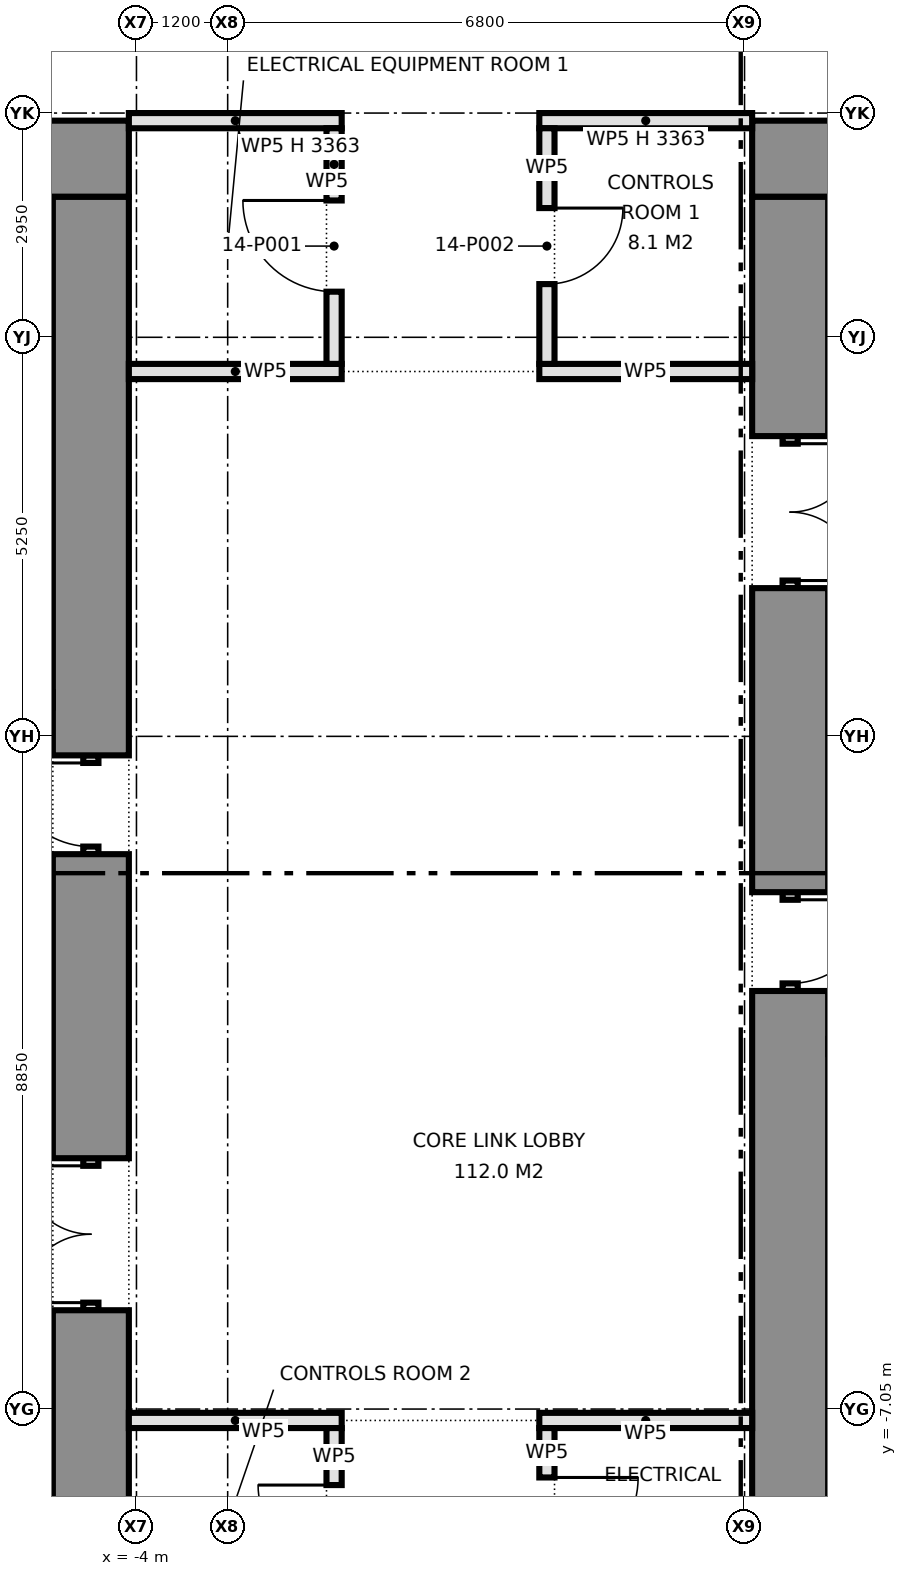
"""IFC4 building model, lengths in metres.
Left out: names, types, materials, properties, quantities, classifications, styles, units other than length and angle.
Written with IfcOpenShell. Run it as: python <this file> out.ifc"""

import sys

from ifc_helpers import new_model, si_unit, direction, frame, frame_2d, origin, place, context, subcontext, project, spatial, rectangle, extrude, element, fill, save


model = new_model("IFC4")
c1 = context("Model", 3, precision=1e-05, world=origin(), true_north=direction((0.0, 1.0)))
c2 = subcontext(c1, "Body", "Model", "MODEL_VIEW")
j1 = project(units=[si_unit("LENGTHUNIT", "METRE"), si_unit("PLANEANGLEUNIT", "RADIAN")], contexts=[c1])
p1 = place(None, origin())
s1 = spatial("IfcSite", under=j1, at=p1, CompositionType="ELEMENT")
p2 = place(p1, origin())
s2 = spatial("IfcBuilding", under=s1, at=p2, CompositionType="ELEMENT")
p3 = place(p2, frame((0.0, 0.0, 64.1)))
s3 = spatial("IfcBuildingStorey", under=s2, at=p3, CompositionType="ELEMENT", Elevation=64.1)
p4 = place(p3, frame((-14.9, 9.4, 0.0), z_axis=(0.0, 0.0, 1.0), x_axis=(1.0, 0.0, 0.0)))
e1 = element("IfcWall", 1, at=p4, inside=s3, PredefinedType="SHEAR", context=c2, shape_type="SweptSolid", body=[
    extrude(rectangle(XDim=10.8, YDim=1.0, at=frame_2d((5.4, 0.0))), origin(), (0.0, 0.0, 1.0), 4.3),
])
p5 = place(p3, frame((-4.6, -8.9, 0.0), z_axis=(0.0, 0.0, 1.0), x_axis=(0.0, 1.0, 0.0)))
e2 = element("IfcWall", 2, at=p5, inside=s3, PredefinedType="SHEAR", context=c2, shape_type="SweptSolid", body=[
    extrude(rectangle(XDim=3.15, YDim=1.0, at=frame_2d((1.575, 0.0))), origin(), (0.0, 0.0, 1.0), 4.3),
])
p6 = place(p3, frame((-4.6, -5.75, 0.0), z_axis=(0.0, 0.0, 1.0), x_axis=(0.0, 1.0, 0.0)))
e3 = element("IfcWall", 3, at=p6, inside=s3, PredefinedType="PARTITIONING", context=c2, shape_type="SweptSolid", body=[
    extrude(rectangle(XDim=2.0, YDim=0.2, at=frame_2d((1.0, 0.0))), origin(), (0.0, 0.0, 1.0), 2.4),
])
p7 = place(p6, frame((0.1, 0.0, 0.0)))
e4 = element("IfcOpeningElement", 4, at=p7, cuts=e3, PredefinedType="OPENING", context=c2, shape_type="SweptSolid", body=[
    extrude(rectangle(XDim=1.8, YDim=2.1, at=frame_2d((0.9, 1.05))), frame((0.0, 0.11, 0.0), z_axis=(0.0, -1.0, 0.0), x_axis=(1.0, 0.0, 0.0)), (0.0, 0.0, 1.0), 0.22),
])
p8 = place(p3, frame((-4.6, -3.75, 0.0), z_axis=(0.0, 0.0, 1.0), x_axis=(0.0, 1.0, 0.0)))
e5 = element("IfcWall", 5, at=p8, inside=s3, PredefinedType="SHEAR", context=c2, shape_type="SweptSolid", body=[
    extrude(rectangle(XDim=4.0, YDim=1.0, at=frame_2d((2.0, 0.0))), origin(), (0.0, 0.0, 1.0), 4.3),
])
p9 = place(p3, frame((-4.6, 0.25, 0.0), z_axis=(0.0, 0.0, 1.0), x_axis=(0.0, 1.0, 0.0)))
e6 = element("IfcWall", 6, at=p9, inside=s3, PredefinedType="PARTITIONING", context=c2, shape_type="SweptSolid", body=[
    extrude(rectangle(XDim=1.3, YDim=0.2, at=frame_2d((0.65, 0.0))), origin(), (0.0, 0.0, 1.0), 2.4),
])
p10 = place(p9, frame((0.1, 0.0, 0.0)))
e7 = element("IfcOpeningElement", 7, at=p10, cuts=e6, PredefinedType="OPENING", context=c2, shape_type="SweptSolid", body=[
    extrude(rectangle(XDim=1.1, YDim=2.1, at=frame_2d((0.55, 1.05))), frame((0.0, 0.11, 0.0), z_axis=(0.0, -1.0, 0.0), x_axis=(1.0, 0.0, 0.0)), (0.0, 0.0, 1.0), 0.22),
])
p11 = place(p3, frame((-4.6, 1.55, 0.0), z_axis=(0.0, 0.0, 1.0), x_axis=(0.0, 1.0, 0.0)))
e8 = element("IfcWall", 8, at=p11, inside=s3, PredefinedType="SHEAR", context=c2, shape_type="SweptSolid", body=[
    extrude(rectangle(XDim=7.35, YDim=1.0, at=frame_2d((3.675, 0.0))), origin(), (0.0, 0.0, 1.0), 4.3),
])
p12 = place(p3, frame((14.9, 9.4, 0.0), z_axis=(0.0, 0.0, 1.0), x_axis=(-1.0, 0.0, 0.0)))
e9 = element("IfcWall", 9, at=p12, inside=s3, PredefinedType="SHEAR", context=c2, shape_type="SweptSolid", body=[
    extrude(rectangle(XDim=10.8, YDim=1.0, at=frame_2d((5.4, 0.0))), origin(), (0.0, 0.0, 1.0), 4.3),
])
p13 = place(p3, frame((4.6, 8.9, 0.0), z_axis=(0.0, 0.0, 1.0), x_axis=(0.0, -1.0, 0.0)))
e10 = element("IfcWall", 10, at=p13, inside=s3, PredefinedType="SHEAR", context=c2, shape_type="SweptSolid", body=[
    extrude(rectangle(XDim=3.15, YDim=1.0, at=frame_2d((1.575, 0.0))), origin(), (0.0, 0.0, 1.0), 4.3),
])
p14 = place(p3, frame((4.6, 5.75, 0.0), z_axis=(0.0, 0.0, 1.0), x_axis=(0.0, -1.0, 0.0)))
e11 = element("IfcWall", 11, at=p14, inside=s3, PredefinedType="PARTITIONING", context=c2, shape_type="SweptSolid", body=[
    extrude(rectangle(XDim=2.0, YDim=0.2, at=frame_2d((1.0, 0.0))), origin(), (0.0, 0.0, 1.0), 2.4),
])
p15 = place(p14, frame((0.1, 0.0, 0.0)))
e12 = element("IfcOpeningElement", 12, at=p15, cuts=e11, PredefinedType="OPENING", context=c2, shape_type="SweptSolid", body=[
    extrude(rectangle(XDim=1.8, YDim=2.1, at=frame_2d((0.9, 1.05))), frame((0.0, 0.11, 0.0), z_axis=(0.0, -1.0, 0.0), x_axis=(1.0, 0.0, 0.0)), (0.0, 0.0, 1.0), 0.22),
])
p16 = place(p3, frame((4.6, 3.75, 0.0), z_axis=(0.0, 0.0, 1.0), x_axis=(0.0, -1.0, 0.0)))
e13 = element("IfcWall", 13, at=p16, inside=s3, PredefinedType="SHEAR", context=c2, shape_type="SweptSolid", body=[
    extrude(rectangle(XDim=4.0, YDim=1.0, at=frame_2d((2.0, 0.0))), origin(), (0.0, 0.0, 1.0), 4.3),
])
p17 = place(p3, frame((4.6, -0.25, 0.0), z_axis=(0.0, 0.0, 1.0), x_axis=(0.0, -1.0, 0.0)))
e14 = element("IfcWall", 14, at=p17, inside=s3, PredefinedType="PARTITIONING", context=c2, shape_type="SweptSolid", body=[
    extrude(rectangle(XDim=1.3, YDim=0.2, at=frame_2d((0.65, 0.0))), origin(), (0.0, 0.0, 1.0), 2.4),
])
p18 = place(p17, frame((0.1, 0.0, 0.0)))
e15 = element("IfcOpeningElement", 15, at=p18, cuts=e14, PredefinedType="OPENING", context=c2, shape_type="SweptSolid", body=[
    extrude(rectangle(XDim=1.1, YDim=2.1, at=frame_2d((0.55, 1.05))), frame((0.0, 0.11, 0.0), z_axis=(0.0, -1.0, 0.0), x_axis=(1.0, 0.0, 0.0)), (0.0, 0.0, 1.0), 0.22),
])
p19 = place(p3, frame((4.6, -1.55, 0.0), z_axis=(0.0, 0.0, 1.0), x_axis=(0.0, -1.0, 0.0)))
e16 = element("IfcWall", 16, at=p19, inside=s3, PredefinedType="SHEAR", context=c2, shape_type="SweptSolid", body=[
    extrude(rectangle(XDim=7.35, YDim=1.0, at=frame_2d((3.675, 0.0))), origin(), (0.0, 0.0, 1.0), 4.3),
])
for number, where, z_axis, x_axis in (
    (17, (-4.1, -7.2, 0.0), (0.0, 0.0, 1.0), (1.0, 0.0, 0.0)),
    (18, (1.3, -7.2, 0.0), (0.0, 0.0, 1.0), (1.0, 0.0, 0.0)),
    (19, (-4.1, 6.6, 0.0), (0.0, 0.0, 1.0), (1.0, 0.0, 0.0)),
    (20, (1.3, 6.6, 0.0), (0.0, 0.0, 1.0), (1.0, 0.0, 0.0)),
):
    element("IfcWall", number, at=place(p3, frame(where, z_axis=z_axis, x_axis=x_axis)), inside=s3, PredefinedType="PARTITIONING", context=c2, shape_type="SweptSolid", body=[
        extrude(rectangle(XDim=2.8, YDim=0.2, at=frame_2d((1.4, 0.0))), origin(), (0.0, 0.0, 1.0), 4.3),
    ])
for number, where, z_axis, x_axis in (
    (21, (-4.1, 9.9, 0.0), (0.0, 0.0, 1.0), (1.0, 0.0, 0.0)),
    (22, (1.3, 9.9, 0.0), (0.0, 0.0, 1.0), (1.0, 0.0, 0.0)),
):
    element("IfcWall", number, at=place(p3, frame(where, z_axis=z_axis, x_axis=x_axis)), inside=s3, PredefinedType="PARTITIONING", context=c2, shape_type="SweptSolid", body=[
        extrude(rectangle(XDim=2.8, YDim=0.2, at=frame_2d((1.4, 0.0))), origin(), (0.0, 0.0, 1.0), 3.363),
    ])
p20 = place(p3, frame((1.4, -9.8, 0.0), z_axis=(0.0, 0.0, 1.0), x_axis=(0.0, 1.0, 0.0)))
e23 = element("IfcWall", 23, at=p20, inside=s3, PredefinedType="PARTITIONING", context=c2, shape_type="SweptSolid", body=[
    extrude(rectangle(XDim=2.5, YDim=0.2, at=frame_2d((1.25, 0.0))), origin(), (0.0, 0.0, 1.0), 4.3),
])
p21 = place(p20, frame((0.65, 0.0, 0.0)))
e24 = element("IfcOpeningElement", 24, at=p21, cuts=e23, PredefinedType="OPENING", context=c2, shape_type="SweptSolid", body=[
    extrude(rectangle(XDim=1.2, YDim=2.1, at=frame_2d((0.6, 1.05))), frame((0.0, 0.11, 0.0), z_axis=(0.0, -1.0, 0.0), x_axis=(1.0, 0.0, 0.0)), (0.0, 0.0, 1.0), 0.22),
])
p22 = place(p3, frame((1.4, 6.7, 0.0), z_axis=(0.0, 0.0, 1.0), x_axis=(0.0, 1.0, 0.0)))
e25 = element("IfcWall", 25, at=p22, inside=s3, PredefinedType="PARTITIONING", context=c2, shape_type="SweptSolid", body=[
    extrude(rectangle(XDim=3.1, YDim=0.2, at=frame_2d((1.55, 0.0))), origin(), (0.0, 0.0, 1.0), 4.3),
])
p23 = place(p22, frame((1.05, 0.0, 0.0)))
e26 = element("IfcOpeningElement", 26, at=p23, cuts=e25, PredefinedType="OPENING", context=c2, shape_type="SweptSolid", body=[
    extrude(rectangle(XDim=1.0, YDim=2.1, at=frame_2d((0.5, 1.05))), frame((0.0, 0.11, 0.0), z_axis=(0.0, -1.0, 0.0), x_axis=(1.0, 0.0, 0.0)), (0.0, 0.0, 1.0), 0.22),
])
p24 = place(p3, frame((-1.4, -9.8, 0.0), z_axis=(0.0, 0.0, 1.0), x_axis=(0.0, 1.0, 0.0)))
e27 = element("IfcWall", 27, at=p24, inside=s3, PredefinedType="PARTITIONING", context=c2, shape_type="SweptSolid", body=[
    extrude(rectangle(XDim=2.5, YDim=0.2, at=frame_2d((1.25, 0.0))), origin(), (0.0, 0.0, 1.0), 4.3),
])
p25 = place(p24, frame((0.75, 0.0, 0.0)))
e28 = element("IfcOpeningElement", 28, at=p25, cuts=e27, PredefinedType="OPENING", context=c2, shape_type="SweptSolid", body=[
    extrude(rectangle(XDim=1.0, YDim=2.1, at=frame_2d((0.5, 1.05))), frame((0.0, 0.11, 0.0), z_axis=(0.0, -1.0, 0.0), x_axis=(1.0, 0.0, 0.0)), (0.0, 0.0, 1.0), 0.22),
])
p26 = place(p3, frame((-1.4, 6.7, 0.0), z_axis=(0.0, 0.0, 1.0), x_axis=(0.0, 1.0, 0.0)))
e29 = element("IfcWall", 29, at=p26, inside=s3, PredefinedType="PARTITIONING", context=c2, shape_type="SweptSolid", body=[
    extrude(rectangle(XDim=3.1, YDim=0.2, at=frame_2d((1.55, 0.0))), origin(), (0.0, 0.0, 1.0), 4.3),
])
p27 = place(p26, frame((0.95, 0.0, 0.0)))
e30 = element("IfcOpeningElement", 30, at=p27, cuts=e29, PredefinedType="OPENING", context=c2, shape_type="SweptSolid", body=[
    extrude(rectangle(XDim=1.2, YDim=2.1, at=frame_2d((0.6, 1.05))), frame((0.0, 0.11, 0.0), z_axis=(0.0, -1.0, 0.0), x_axis=(1.0, 0.0, 0.0)), (0.0, 0.0, 1.0), 0.22),
])
p28 = place(p7, origin())
e31 = element("IfcDoor", 31, at=p28, inside=s3, OperationType="DOUBLE_DOOR_SINGLE_SWING", PredefinedType="DOOR", context=c2, shape_type="SweptSolid", body=[
    extrude(rectangle(XDim=1.8, YDim=2.1, at=frame_2d((0.9, 1.05))), frame((0.0, 0.025, 0.0), z_axis=(0.0, -1.0, 0.0), x_axis=(1.0, 0.0, 0.0)), (0.0, 0.0, 1.0), 0.05),
])
fill(e4, e31)
p29 = place(p10, origin())
e32 = element("IfcDoor", 32, at=p29, inside=s3, OperationType="SINGLE_SWING_RIGHT", PredefinedType="DOOR", context=c2, shape_type="SweptSolid", body=[
    extrude(rectangle(XDim=1.1, YDim=2.1, at=frame_2d((0.55, 1.05))), frame((0.0, 0.025, 0.0), z_axis=(0.0, -1.0, 0.0), x_axis=(1.0, 0.0, 0.0)), (0.0, 0.0, 1.0), 0.05),
])
fill(e7, e32)
p30 = place(p15, origin())
e33 = element("IfcDoor", 33, at=p30, inside=s3, OperationType="DOUBLE_DOOR_SINGLE_SWING", PredefinedType="DOOR", context=c2, shape_type="SweptSolid", body=[
    extrude(rectangle(XDim=1.8, YDim=2.1, at=frame_2d((0.9, 1.05))), frame((0.0, 0.025, 0.0), z_axis=(0.0, -1.0, 0.0), x_axis=(1.0, 0.0, 0.0)), (0.0, 0.0, 1.0), 0.05),
])
fill(e12, e33)
p31 = place(p18, origin())
e34 = element("IfcDoor", 34, at=p31, inside=s3, OperationType="SINGLE_SWING_LEFT", PredefinedType="DOOR", context=c2, shape_type="SweptSolid", body=[
    extrude(rectangle(XDim=1.1, YDim=2.1, at=frame_2d((0.55, 1.05))), frame((0.0, 0.025, 0.0), z_axis=(0.0, -1.0, 0.0), x_axis=(1.0, 0.0, 0.0)), (0.0, 0.0, 1.0), 0.05),
])
fill(e15, e34)
p32 = place(p27, origin())
e35 = element("IfcDoor", 35, at=p32, inside=s3, OperationType="SINGLE_SWING_RIGHT", PredefinedType="DOOR", context=c2, shape_type="SweptSolid", body=[
    extrude(rectangle(XDim=1.2, YDim=2.1, at=frame_2d((0.6, 1.05))), frame((0.0, 0.025, 0.0), z_axis=(0.0, -1.0, 0.0), x_axis=(1.0, 0.0, 0.0)), (0.0, 0.0, 1.0), 0.05),
])
fill(e30, e35)
p33 = place(p23, frame((1.0, 0.0, 0.0), z_axis=(0.0, 0.0, 1.0), x_axis=(-1.0, 0.0, 0.0)))
e36 = element("IfcDoor", 36, at=p33, inside=s3, OperationType="SINGLE_SWING_LEFT", PredefinedType="DOOR", context=c2, shape_type="SweptSolid", body=[
    extrude(rectangle(XDim=1.0, YDim=2.1, at=frame_2d((0.5, 1.05))), frame((0.0, 0.025, 0.0), z_axis=(0.0, -1.0, 0.0), x_axis=(1.0, 0.0, 0.0)), (0.0, 0.0, 1.0), 0.05),
])
fill(e26, e36)
p34 = place(p25, origin())
e37 = element("IfcDoor", 37, at=p34, inside=s3, OperationType="SINGLE_SWING_RIGHT", PredefinedType="DOOR", context=c2, shape_type="SweptSolid", body=[
    extrude(rectangle(XDim=1.0, YDim=2.1, at=frame_2d((0.5, 1.05))), frame((0.0, 0.025, 0.0), z_axis=(0.0, -1.0, 0.0), x_axis=(1.0, 0.0, 0.0)), (0.0, 0.0, 1.0), 0.05),
])
fill(e28, e37)
p35 = place(p21, frame((1.2, 0.0, 0.0), z_axis=(0.0, 0.0, 1.0), x_axis=(-1.0, 0.0, 0.0)))
e38 = element("IfcDoor", 38, at=p35, inside=s3, OperationType="SINGLE_SWING_LEFT", PredefinedType="DOOR", context=c2, shape_type="SweptSolid", body=[
    extrude(rectangle(XDim=1.2, YDim=2.1, at=frame_2d((0.6, 1.05))), frame((0.0, 0.025, 0.0), z_axis=(0.0, -1.0, 0.0), x_axis=(1.0, 0.0, 0.0)), (0.0, 0.0, 1.0), 0.05),
])
fill(e24, e38)
save(model, sys.argv[1])
